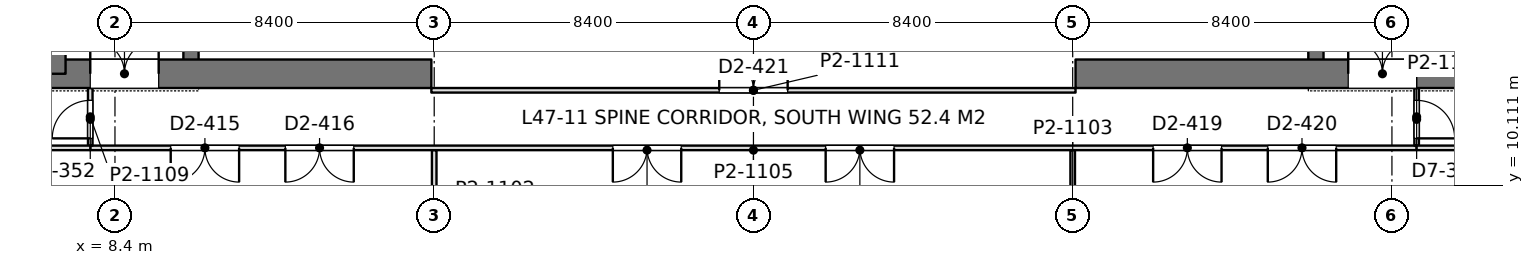
"""IFC4 building model, lengths in metres.
Left out: names, types, materials, properties, quantities, classifications, styles, units other than length and angle.
Written with IfcOpenShell. Run it as: python <this file> out.ifc"""

import sys

from ifc_helpers import new_model, si_unit, direction, frame, frame_2d, origin, place, context, subcontext, project, spatial, rectangle, extrude, element, fill, save


model = new_model("IFC4")
c1 = context("Model", 3, precision=1e-05, world=origin(), true_north=direction((0.0, 1.0)))
c2 = subcontext(c1, "Body", "Model", "MODEL_VIEW")
j1 = project(units=[si_unit("LENGTHUNIT", "METRE"), si_unit("PLANEANGLEUNIT", "RADIAN")], contexts=[c1])
p1 = place(None, origin())
s1 = spatial("IfcSite", under=j1, at=p1, CompositionType="ELEMENT")
p2 = place(p1, origin())
s2 = spatial("IfcBuilding", under=s1, at=p2, CompositionType="ELEMENT")
p3 = place(p2, frame((0.0, 0.0, 207.0)))
s3 = spatial("IfcBuildingStorey", under=s2, at=p3, CompositionType="ELEMENT", Elevation=207.0)
p4 = place(p3, frame((-1.125, 13.05, 0.0), z_axis=(0.0, 0.0, 1.0), x_axis=(1.0, 0.0, 0.0)))
e1 = element("IfcWall", 1, at=p4, inside=s3, PredefinedType="SHEAR", context=c2, shape_type="SweptSolid", body=[
    extrude(rectangle(XDim=17.85, YDim=0.75, at=frame_2d((8.925, 0.0))), origin(), (0.0, 0.0, 1.0), 4.2),
])
p5 = place(p4, frame((8.875, 0.0, 0.0)))
e2 = element("IfcOpeningElement", 2, at=p5, cuts=e1, PredefinedType="OPENING", context=c2, shape_type="SweptSolid", body=[
    extrude(rectangle(XDim=1.8, YDim=2.4, at=frame_2d((0.9, 1.2))), frame((0.0, 0.385, 0.0), z_axis=(0.0, -1.0, 0.0), x_axis=(1.0, 0.0, 0.0)), (0.0, 0.0, 1.0), 0.77),
])
p6 = place(p3, frame((6.9, 13.05, 0.0), z_axis=(0.0, 0.0, 1.0), x_axis=(0.0, 1.0, 0.0)))
e3 = element("IfcWall", 3, at=p6, inside=s3, PredefinedType="SHEAR", context=c2, shape_type="SweptSolid", body=[
    extrude(rectangle(XDim=24.3, YDim=0.4, at=frame_2d((12.15, 0.0))), origin(), (0.0, 0.0, 1.0), 4.2),
])
p7 = place(p6, frame((1.3, 0.0, 0.0)))
e4 = element("IfcOpeningElement", 4, at=p7, cuts=e3, PredefinedType="OPENING", context=c2, shape_type="SweptSolid", body=[
    extrude(rectangle(XDim=1.0, YDim=2.2, at=frame_2d((0.5, 1.1))), frame((0.0, 0.21, 0.0), z_axis=(0.0, -1.0, 0.0), x_axis=(1.0, 0.0, 0.0)), (0.0, 0.0, 1.0), 0.42),
])
p8 = place(p6, frame((22.0, 0.0, 0.0)))
e5 = element("IfcOpeningElement", 5, at=p8, cuts=e3, PredefinedType="OPENING", context=c2, shape_type="SweptSolid", body=[
    extrude(rectangle(XDim=1.0, YDim=2.2, at=frame_2d((0.5, 1.1))), frame((0.0, 0.21, 0.0), z_axis=(0.0, -1.0, 0.0), x_axis=(1.0, 0.0, 0.0)), (0.0, 0.0, 1.0), 0.42),
])
p9 = place(p6, frame((5.55, 0.0, 0.0)))
e6 = element("IfcOpeningElement", 6, at=p9, cuts=e3, PredefinedType="OPENING", context=c2, shape_type="SweptSolid", body=[
    extrude(rectangle(XDim=1.0, YDim=2.2, at=frame_2d((0.5, 1.1))), frame((0.0, 0.21, 0.0), z_axis=(0.0, -1.0, 0.0), x_axis=(1.0, 0.0, 0.0)), (0.0, 0.0, 1.0), 0.42),
])
p10 = place(p6, frame((9.55, 0.0, 0.0)))
e7 = element("IfcOpeningElement", 7, at=p10, cuts=e3, PredefinedType="OPENING", context=c2, shape_type="SweptSolid", body=[
    extrude(rectangle(XDim=1.0, YDim=2.2, at=frame_2d((0.5, 1.1))), frame((0.0, 0.21, 0.0), z_axis=(0.0, -1.0, 0.0), x_axis=(1.0, 0.0, 0.0)), (0.0, 0.0, 1.0), 0.42),
])
p11 = place(p6, frame((12.8, 0.0, 0.0)))
e8 = element("IfcOpeningElement", 8, at=p11, cuts=e3, PredefinedType="OPENING", context=c2, shape_type="SweptSolid", body=[
    extrude(rectangle(XDim=1.1, YDim=2.2, at=frame_2d((0.55, 1.1))), frame((0.0, 0.21, 0.0), z_axis=(0.0, -1.0, 0.0), x_axis=(1.0, 0.0, 0.0)), (0.0, 0.0, 1.0), 0.42),
])
p12 = place(p6, frame((15.538, 0.0, 0.0)))
e9 = element("IfcOpeningElement", 9, at=p12, cuts=e3, PredefinedType="OPENING", context=c2, shape_type="SweptSolid", body=[
    extrude(rectangle(XDim=1.1, YDim=2.2, at=frame_2d((0.55, 1.1))), frame((0.0, 0.21, 0.0), z_axis=(0.0, -1.0, 0.0), x_axis=(1.0, 0.0, 0.0)), (0.0, 0.0, 1.0), 0.42),
])
p13 = place(p6, frame((18.262, 0.0, 0.0)))
e10 = element("IfcOpeningElement", 10, at=p13, cuts=e3, PredefinedType="OPENING", context=c2, shape_type="SweptSolid", body=[
    extrude(rectangle(XDim=1.1, YDim=2.2, at=frame_2d((0.55, 1.1))), frame((0.0, 0.21, 0.0), z_axis=(0.0, -1.0, 0.0), x_axis=(1.0, 0.0, 0.0)), (0.0, 0.0, 1.0), 0.42),
])
p14 = place(p3, frame((10.4, 13.05, 0.0), z_axis=(0.0, 0.0, 1.0), x_axis=(0.0, 1.0, 0.0)))
e11 = element("IfcWall", 11, at=p14, inside=s3, PredefinedType="SHEAR", context=c2, shape_type="SweptSolid", body=[
    extrude(rectangle(XDim=24.3, YDim=0.4, at=frame_2d((12.15, 0.0))), origin(), (0.0, 0.0, 1.0), 4.2),
])
p15 = place(p14, frame((15.75, 0.0, 0.0)))
e12 = element("IfcOpeningElement", 12, at=p15, cuts=e11, PredefinedType="OPENING", context=c2, shape_type="SweptSolid", body=[
    extrude(rectangle(XDim=1.1, YDim=2.2, at=frame_2d((0.55, 1.1))), frame((0.0, 0.21, 0.0), z_axis=(0.0, -1.0, 0.0), x_axis=(1.0, 0.0, 0.0)), (0.0, 0.0, 1.0), 0.42),
])
p16 = place(p14, frame((18.6, 0.0, 0.0)))
e13 = element("IfcOpeningElement", 13, at=p16, cuts=e11, PredefinedType="OPENING", context=c2, shape_type="SweptSolid", body=[
    extrude(rectangle(XDim=1.1, YDim=2.2, at=frame_2d((0.55, 1.1))), frame((0.0, 0.21, 0.0), z_axis=(0.0, -1.0, 0.0), x_axis=(1.0, 0.0, 0.0)), (0.0, 0.0, 1.0), 0.42),
])
p17 = place(p14, frame((21.45, 0.0, 0.0)))
e14 = element("IfcOpeningElement", 14, at=p17, cuts=e11, PredefinedType="OPENING", context=c2, shape_type="SweptSolid", body=[
    extrude(rectangle(XDim=1.1, YDim=2.2, at=frame_2d((0.55, 1.1))), frame((0.0, 0.21, 0.0), z_axis=(0.0, -1.0, 0.0), x_axis=(1.0, 0.0, 0.0)), (0.0, 0.0, 1.0), 0.42),
])
p18 = place(p14, frame((8.65, 0.0, 0.0)))
e15 = element("IfcOpeningElement", 15, at=p18, cuts=e11, PredefinedType="OPENING", context=c2, shape_type="SweptSolid", body=[
    extrude(rectangle(XDim=1.8, YDim=2.4, at=frame_2d((0.9, 1.2))), frame((0.0, 0.21, 0.0), z_axis=(0.0, -1.0, 0.0), x_axis=(1.0, 0.0, 0.0)), (0.0, 0.0, 1.0), 0.42),
])
p19 = place(p3, frame((33.675, 13.05, 0.0), z_axis=(0.0, 0.0, 1.0), x_axis=(1.0, 0.0, 0.0)))
e16 = element("IfcWall", 16, at=p19, inside=s3, PredefinedType="SHEAR", context=c2, shape_type="SweptSolid", body=[
    extrude(rectangle(XDim=17.85, YDim=0.75, at=frame_2d((8.925, 0.0))), origin(), (0.0, 0.0, 1.0), 4.2),
])
p20 = place(p19, frame((7.175, 0.0, 0.0)))
e17 = element("IfcOpeningElement", 17, at=p20, cuts=e16, PredefinedType="OPENING", context=c2, shape_type="SweptSolid", body=[
    extrude(rectangle(XDim=1.8, YDim=2.4, at=frame_2d((0.9, 1.2))), frame((0.0, 0.385, 0.0), z_axis=(0.0, -1.0, 0.0), x_axis=(1.0, 0.0, 0.0)), (0.0, 0.0, 1.0), 0.77),
])
p21 = place(p3, frame((43.5, 13.05, 0.0), z_axis=(0.0, 0.0, 1.0), x_axis=(0.0, 1.0, 0.0)))
e18 = element("IfcWall", 18, at=p21, inside=s3, PredefinedType="SHEAR", context=c2, shape_type="SweptSolid", body=[
    extrude(rectangle(XDim=24.3, YDim=0.4, at=frame_2d((12.15, 0.0))), origin(), (0.0, 0.0, 1.0), 4.2),
])
p22 = place(p21, frame((1.3, 0.0, 0.0)))
e19 = element("IfcOpeningElement", 19, at=p22, cuts=e18, PredefinedType="OPENING", context=c2, shape_type="SweptSolid", body=[
    extrude(rectangle(XDim=1.0, YDim=2.2, at=frame_2d((0.5, 1.1))), frame((0.0, 0.21, 0.0), z_axis=(0.0, -1.0, 0.0), x_axis=(1.0, 0.0, 0.0)), (0.0, 0.0, 1.0), 0.42),
])
p23 = place(p21, frame((22.0, 0.0, 0.0)))
e20 = element("IfcOpeningElement", 20, at=p23, cuts=e18, PredefinedType="OPENING", context=c2, shape_type="SweptSolid", body=[
    extrude(rectangle(XDim=1.0, YDim=2.2, at=frame_2d((0.5, 1.1))), frame((0.0, 0.21, 0.0), z_axis=(0.0, -1.0, 0.0), x_axis=(1.0, 0.0, 0.0)), (0.0, 0.0, 1.0), 0.42),
])
p24 = place(p21, frame((5.55, 0.0, 0.0)))
e21 = element("IfcOpeningElement", 21, at=p24, cuts=e18, PredefinedType="OPENING", context=c2, shape_type="SweptSolid", body=[
    extrude(rectangle(XDim=1.0, YDim=2.2, at=frame_2d((0.5, 1.1))), frame((0.0, 0.21, 0.0), z_axis=(0.0, -1.0, 0.0), x_axis=(1.0, 0.0, 0.0)), (0.0, 0.0, 1.0), 0.42),
])
p25 = place(p21, frame((9.55, 0.0, 0.0)))
e22 = element("IfcOpeningElement", 22, at=p25, cuts=e18, PredefinedType="OPENING", context=c2, shape_type="SweptSolid", body=[
    extrude(rectangle(XDim=1.0, YDim=2.2, at=frame_2d((0.5, 1.1))), frame((0.0, 0.21, 0.0), z_axis=(0.0, -1.0, 0.0), x_axis=(1.0, 0.0, 0.0)), (0.0, 0.0, 1.0), 0.42),
])
p26 = place(p21, frame((12.8, 0.0, 0.0)))
e23 = element("IfcOpeningElement", 23, at=p26, cuts=e18, PredefinedType="OPENING", context=c2, shape_type="SweptSolid", body=[
    extrude(rectangle(XDim=1.1, YDim=2.2, at=frame_2d((0.55, 1.1))), frame((0.0, 0.21, 0.0), z_axis=(0.0, -1.0, 0.0), x_axis=(1.0, 0.0, 0.0)), (0.0, 0.0, 1.0), 0.42),
])
p27 = place(p21, frame((15.538, 0.0, 0.0)))
e24 = element("IfcOpeningElement", 24, at=p27, cuts=e18, PredefinedType="OPENING", context=c2, shape_type="SweptSolid", body=[
    extrude(rectangle(XDim=1.1, YDim=2.2, at=frame_2d((0.55, 1.1))), frame((0.0, 0.21, 0.0), z_axis=(0.0, -1.0, 0.0), x_axis=(1.0, 0.0, 0.0)), (0.0, 0.0, 1.0), 0.42),
])
p28 = place(p21, frame((18.262, 0.0, 0.0)))
e25 = element("IfcOpeningElement", 25, at=p28, cuts=e18, PredefinedType="OPENING", context=c2, shape_type="SweptSolid", body=[
    extrude(rectangle(XDim=1.1, YDim=2.2, at=frame_2d((0.55, 1.1))), frame((0.0, 0.21, 0.0), z_axis=(0.0, -1.0, 0.0), x_axis=(1.0, 0.0, 0.0)), (0.0, 0.0, 1.0), 0.42),
])
p29 = place(p3, frame((40.0, 13.05, 0.0), z_axis=(0.0, 0.0, 1.0), x_axis=(0.0, 1.0, 0.0)))
e26 = element("IfcWall", 26, at=p29, inside=s3, PredefinedType="SHEAR", context=c2, shape_type="SweptSolid", body=[
    extrude(rectangle(XDim=24.3, YDim=0.4, at=frame_2d((12.15, 0.0))), origin(), (0.0, 0.0, 1.0), 4.2),
])
p30 = place(p29, frame((15.75, 0.0, 0.0)))
e27 = element("IfcOpeningElement", 27, at=p30, cuts=e26, PredefinedType="OPENING", context=c2, shape_type="SweptSolid", body=[
    extrude(rectangle(XDim=1.1, YDim=2.2, at=frame_2d((0.55, 1.1))), frame((0.0, 0.21, 0.0), z_axis=(0.0, -1.0, 0.0), x_axis=(1.0, 0.0, 0.0)), (0.0, 0.0, 1.0), 0.42),
])
p31 = place(p29, frame((18.6, 0.0, 0.0)))
e28 = element("IfcOpeningElement", 28, at=p31, cuts=e26, PredefinedType="OPENING", context=c2, shape_type="SweptSolid", body=[
    extrude(rectangle(XDim=1.1, YDim=2.2, at=frame_2d((0.55, 1.1))), frame((0.0, 0.21, 0.0), z_axis=(0.0, -1.0, 0.0), x_axis=(1.0, 0.0, 0.0)), (0.0, 0.0, 1.0), 0.42),
])
p32 = place(p29, frame((21.45, 0.0, 0.0)))
e29 = element("IfcOpeningElement", 29, at=p32, cuts=e26, PredefinedType="OPENING", context=c2, shape_type="SweptSolid", body=[
    extrude(rectangle(XDim=1.1, YDim=2.2, at=frame_2d((0.55, 1.1))), frame((0.0, 0.21, 0.0), z_axis=(0.0, -1.0, 0.0), x_axis=(1.0, 0.0, 0.0)), (0.0, 0.0, 1.0), 0.42),
])
p33 = place(p29, frame((8.65, 0.0, 0.0)))
e30 = element("IfcOpeningElement", 30, at=p33, cuts=e26, PredefinedType="OPENING", context=c2, shape_type="SweptSolid", body=[
    extrude(rectangle(XDim=1.8, YDim=2.4, at=frame_2d((0.9, 1.2))), frame((0.0, 0.21, 0.0), z_axis=(0.0, -1.0, 0.0), x_axis=(1.0, 0.0, 0.0)), (0.0, 0.0, 1.0), 0.42),
])
for number, where, z_axis, x_axis in (
    (31, (16.8, 8.949, 0.0), (0.0, 0.0, 1.0), (0.0, 1.0, 0.0)),
    (32, (33.6, 8.949, 0.0), (0.0, 0.0, 1.0), (0.0, 1.0, 0.0)),
):
    element("IfcWall", number, at=place(p3, frame(where, z_axis=z_axis, x_axis=x_axis)), inside=s3, PredefinedType="PARTITIONING", context=c2, shape_type="SweptSolid", body=[
        extrude(rectangle(XDim=2.093, YDim=0.12, at=frame_2d((1.046, 0.0))), origin(), (0.0, 0.0, 1.0), 3.69),
    ])
p34 = place(p3, frame((7.748, 11.1, 0.0), z_axis=(0.0, 0.0, 1.0), x_axis=(1.0, 0.0, 0.0)))
e33 = element("IfcWall", 33, at=p34, inside=s3, PredefinedType="PARTITIONING", context=c2, shape_type="SweptSolid", body=[
    extrude(rectangle(XDim=34.904, YDim=0.12, at=frame_2d((17.452, 0.0))), origin(), (0.0, 0.0, 1.0), 3.55),
])
p35 = place(p34, frame((2.119, 0.0, 0.0)))
e34 = element("IfcOpeningElement", 34, at=p35, cuts=e33, PredefinedType="OPENING", context=c2, shape_type="SweptSolid", body=[
    extrude(rectangle(XDim=1.8, YDim=2.2, at=frame_2d((0.9, 1.1))), frame((0.0, 0.07, 0.0), z_axis=(0.0, -1.0, 0.0), x_axis=(1.0, 0.0, 0.0)), (0.0, 0.0, 1.0), 0.14),
])
p36 = place(p34, frame((5.135, 0.0, 0.0)))
e35 = element("IfcOpeningElement", 35, at=p36, cuts=e33, PredefinedType="OPENING", context=c2, shape_type="SweptSolid", body=[
    extrude(rectangle(XDim=1.8, YDim=2.2, at=frame_2d((0.9, 1.1))), frame((0.0, 0.07, 0.0), z_axis=(0.0, -1.0, 0.0), x_axis=(1.0, 0.0, 0.0)), (0.0, 0.0, 1.0), 0.14),
])
p37 = place(p34, frame((13.752, 0.0, 0.0)))
e36 = element("IfcOpeningElement", 36, at=p37, cuts=e33, PredefinedType="OPENING", context=c2, shape_type="SweptSolid", body=[
    extrude(rectangle(XDim=1.8, YDim=2.2, at=frame_2d((0.9, 1.1))), frame((0.0, 0.07, 0.0), z_axis=(0.0, -1.0, 0.0), x_axis=(1.0, 0.0, 0.0)), (0.0, 0.0, 1.0), 0.14),
])
p38 = place(p34, frame((19.352, 0.0, 0.0)))
e37 = element("IfcOpeningElement", 37, at=p38, cuts=e33, PredefinedType="OPENING", context=c2, shape_type="SweptSolid", body=[
    extrude(rectangle(XDim=1.8, YDim=2.2, at=frame_2d((0.9, 1.1))), frame((0.0, 0.07, 0.0), z_axis=(0.0, -1.0, 0.0), x_axis=(1.0, 0.0, 0.0)), (0.0, 0.0, 1.0), 0.14),
])
p39 = place(p34, frame((27.969, 0.0, 0.0)))
e38 = element("IfcOpeningElement", 38, at=p39, cuts=e33, PredefinedType="OPENING", context=c2, shape_type="SweptSolid", body=[
    extrude(rectangle(XDim=1.8, YDim=2.2, at=frame_2d((0.9, 1.1))), frame((0.0, 0.07, 0.0), z_axis=(0.0, -1.0, 0.0), x_axis=(1.0, 0.0, 0.0)), (0.0, 0.0, 1.0), 0.14),
])
p40 = place(p34, frame((30.985, 0.0, 0.0)))
e39 = element("IfcOpeningElement", 39, at=p40, cuts=e33, PredefinedType="OPENING", context=c2, shape_type="SweptSolid", body=[
    extrude(rectangle(XDim=1.8, YDim=2.2, at=frame_2d((0.9, 1.1))), frame((0.0, 0.07, 0.0), z_axis=(0.0, -1.0, 0.0), x_axis=(1.0, 0.0, 0.0)), (0.0, 0.0, 1.0), 0.14),
])
p41 = place(p3, frame((7.75, 11.158, 0.0), z_axis=(0.0, 0.0, 1.0), x_axis=(0.0, 1.0, 0.0)))
e40 = element("IfcWall", 40, at=p41, inside=s3, PredefinedType="PARTITIONING", context=c2, shape_type="SweptSolid", body=[
    extrude(rectangle(XDim=1.518, YDim=0.12, at=frame_2d((0.759, 0.0))), origin(), (0.0, 0.0, 1.0), 4.05),
])
p42 = place(p41, frame((0.192, 0.0, 0.0)))
e41 = element("IfcOpeningElement", 41, at=p42, cuts=e40, PredefinedType="OPENING", context=c2, shape_type="SweptSolid", body=[
    extrude(rectangle(XDim=1.0, YDim=2.4, at=frame_2d((0.5, 1.2))), frame((0.0, 0.07, 0.0), z_axis=(0.0, -1.0, 0.0), x_axis=(1.0, 0.0, 0.0)), (0.0, 0.0, 1.0), 0.14),
])
p43 = place(p3, frame((42.65, 11.158, 0.0), z_axis=(0.0, 0.0, 1.0), x_axis=(0.0, 1.0, 0.0)))
e42 = element("IfcWall", 42, at=p43, inside=s3, PredefinedType="PARTITIONING", context=c2, shape_type="SweptSolid", body=[
    extrude(rectangle(XDim=1.518, YDim=0.12, at=frame_2d((0.759, 0.0))), origin(), (0.0, 0.0, 1.0), 4.05),
])
p44 = place(p43, frame((0.192, 0.0, 0.0)))
e43 = element("IfcOpeningElement", 43, at=p44, cuts=e42, PredefinedType="OPENING", context=c2, shape_type="SweptSolid", body=[
    extrude(rectangle(XDim=1.0, YDim=2.4, at=frame_2d((0.5, 1.2))), frame((0.0, 0.07, 0.0), z_axis=(0.0, -1.0, 0.0), x_axis=(1.0, 0.0, 0.0)), (0.0, 0.0, 1.0), 0.14),
])
for number, where, z_axis, x_axis in (
    (44, (1.2, 11.1, 0.0), (0.0, 0.0, 1.0), (1.0, 0.0, 0.0)),
    (45, (42.648, 11.1, 0.0), (0.0, 0.0, 1.0), (1.0, 0.0, 0.0)),
):
    element("IfcWall", number, at=place(p3, frame(where, z_axis=z_axis, x_axis=x_axis)), inside=s3, PredefinedType="PARTITIONING", context=c2, shape_type="SweptSolid", body=[
        extrude(rectangle(XDim=6.552, YDim=0.12, at=frame_2d((3.276, 0.0))), origin(), (0.0, 0.0, 1.0), 4.05),
    ])
p45 = place(p3, frame((16.725, 12.615, 0.0), z_axis=(0.0, 0.0, 1.0), x_axis=(1.0, 0.0, 0.0)))
e46 = element("IfcWall", 46, at=p45, inside=s3, PredefinedType="PARTITIONING", context=c2, shape_type="SweptSolid", body=[
    extrude(rectangle(XDim=16.95, YDim=0.12, at=frame_2d((8.475, 0.0))), origin(), (0.0, 0.0, 1.0), 3.55),
])
p46 = place(p45, frame((7.575, 0.0, 0.0)))
e47 = element("IfcOpeningElement", 47, at=p46, cuts=e46, PredefinedType="OPENING", context=c2, shape_type="SweptSolid", body=[
    extrude(rectangle(XDim=1.8, YDim=2.2, at=frame_2d((0.9, 1.1))), frame((0.0, 0.07, 0.0), z_axis=(0.0, -1.0, 0.0), x_axis=(1.0, 0.0, 0.0)), (0.0, 0.0, 1.0), 0.14),
])
p47 = place(p5, origin())
e48 = element("IfcDoor", 48, at=p47, inside=s3, OperationType="DOUBLE_DOOR_SINGLE_SWING", PredefinedType="DOOR", context=c2, shape_type="SweptSolid", body=[
    extrude(rectangle(XDim=1.8, YDim=2.4, at=frame_2d((0.9, 1.2))), frame((0.0, 0.025, 0.0), z_axis=(0.0, -1.0, 0.0), x_axis=(1.0, 0.0, 0.0)), (0.0, 0.0, 1.0), 0.05),
])
fill(e2, e48)
p48 = place(p20, origin())
e49 = element("IfcDoor", 49, at=p48, inside=s3, OperationType="DOUBLE_DOOR_SINGLE_SWING", PredefinedType="DOOR", context=c2, shape_type="SweptSolid", body=[
    extrude(rectangle(XDim=1.8, YDim=2.4, at=frame_2d((0.9, 1.2))), frame((0.0, 0.025, 0.0), z_axis=(0.0, -1.0, 0.0), x_axis=(1.0, 0.0, 0.0)), (0.0, 0.0, 1.0), 0.05),
])
fill(e17, e49)
p49 = place(p35, frame((1.8, 0.0, 0.0), z_axis=(0.0, 0.0, 1.0), x_axis=(-1.0, 0.0, 0.0)))
e50 = element("IfcDoor", 50, at=p49, inside=s3, OperationType="DOUBLE_DOOR_SINGLE_SWING", PredefinedType="DOOR", context=c2, shape_type="SweptSolid", body=[
    extrude(rectangle(XDim=1.8, YDim=2.2, at=frame_2d((0.9, 1.1))), frame((0.0, 0.025, 0.0), z_axis=(0.0, -1.0, 0.0), x_axis=(1.0, 0.0, 0.0)), (0.0, 0.0, 1.0), 0.05),
])
fill(e34, e50)
p50 = place(p36, frame((1.8, 0.0, 0.0), z_axis=(0.0, 0.0, 1.0), x_axis=(-1.0, 0.0, 0.0)))
e51 = element("IfcDoor", 51, at=p50, inside=s3, OperationType="DOUBLE_DOOR_SINGLE_SWING", PredefinedType="DOOR", context=c2, shape_type="SweptSolid", body=[
    extrude(rectangle(XDim=1.8, YDim=2.2, at=frame_2d((0.9, 1.1))), frame((0.0, 0.025, 0.0), z_axis=(0.0, -1.0, 0.0), x_axis=(1.0, 0.0, 0.0)), (0.0, 0.0, 1.0), 0.05),
])
fill(e35, e51)
p51 = place(p37, frame((1.8, 0.0, 0.0), z_axis=(0.0, 0.0, 1.0), x_axis=(-1.0, 0.0, 0.0)))
e52 = element("IfcDoor", 52, at=p51, inside=s3, OperationType="DOUBLE_DOOR_SINGLE_SWING", PredefinedType="DOOR", context=c2, shape_type="SweptSolid", body=[
    extrude(rectangle(XDim=1.8, YDim=2.2, at=frame_2d((0.9, 1.1))), frame((0.0, 0.025, 0.0), z_axis=(0.0, -1.0, 0.0), x_axis=(1.0, 0.0, 0.0)), (0.0, 0.0, 1.0), 0.05),
])
fill(e36, e52)
p52 = place(p38, frame((1.8, 0.0, 0.0), z_axis=(0.0, 0.0, 1.0), x_axis=(-1.0, 0.0, 0.0)))
e53 = element("IfcDoor", 53, at=p52, inside=s3, OperationType="DOUBLE_DOOR_SINGLE_SWING", PredefinedType="DOOR", context=c2, shape_type="SweptSolid", body=[
    extrude(rectangle(XDim=1.8, YDim=2.2, at=frame_2d((0.9, 1.1))), frame((0.0, 0.025, 0.0), z_axis=(0.0, -1.0, 0.0), x_axis=(1.0, 0.0, 0.0)), (0.0, 0.0, 1.0), 0.05),
])
fill(e37, e53)
p53 = place(p39, frame((1.8, 0.0, 0.0), z_axis=(0.0, 0.0, 1.0), x_axis=(-1.0, 0.0, 0.0)))
e54 = element("IfcDoor", 54, at=p53, inside=s3, OperationType="DOUBLE_DOOR_SINGLE_SWING", PredefinedType="DOOR", context=c2, shape_type="SweptSolid", body=[
    extrude(rectangle(XDim=1.8, YDim=2.2, at=frame_2d((0.9, 1.1))), frame((0.0, 0.025, 0.0), z_axis=(0.0, -1.0, 0.0), x_axis=(1.0, 0.0, 0.0)), (0.0, 0.0, 1.0), 0.05),
])
fill(e38, e54)
p54 = place(p40, frame((1.8, 0.0, 0.0), z_axis=(0.0, 0.0, 1.0), x_axis=(-1.0, 0.0, 0.0)))
e55 = element("IfcDoor", 55, at=p54, inside=s3, OperationType="DOUBLE_DOOR_SINGLE_SWING", PredefinedType="DOOR", context=c2, shape_type="SweptSolid", body=[
    extrude(rectangle(XDim=1.8, YDim=2.2, at=frame_2d((0.9, 1.1))), frame((0.0, 0.025, 0.0), z_axis=(0.0, -1.0, 0.0), x_axis=(1.0, 0.0, 0.0)), (0.0, 0.0, 1.0), 0.05),
])
fill(e39, e55)
p55 = place(p42, origin())
e56 = element("IfcDoor", 56, at=p55, inside=s3, OperationType="SINGLE_SWING_LEFT", PredefinedType="DOOR", context=c2, shape_type="SweptSolid", body=[
    extrude(rectangle(XDim=1.0, YDim=2.4, at=frame_2d((0.5, 1.2))), frame((0.0, 0.025, 0.0), z_axis=(0.0, -1.0, 0.0), x_axis=(1.0, 0.0, 0.0)), (0.0, 0.0, 1.0), 0.05),
])
fill(e41, e56)
p56 = place(p44, frame((1.0, 0.0, 0.0), z_axis=(0.0, 0.0, 1.0), x_axis=(-1.0, 0.0, 0.0)))
e57 = element("IfcDoor", 57, at=p56, inside=s3, OperationType="SINGLE_SWING_RIGHT", PredefinedType="DOOR", context=c2, shape_type="SweptSolid", body=[
    extrude(rectangle(XDim=1.0, YDim=2.4, at=frame_2d((0.5, 1.2))), frame((0.0, 0.025, 0.0), z_axis=(0.0, -1.0, 0.0), x_axis=(1.0, 0.0, 0.0)), (0.0, 0.0, 1.0), 0.05),
])
fill(e43, e57)
p57 = place(p46, origin())
e58 = element("IfcDoor", 58, at=p57, inside=s3, OperationType="DOUBLE_DOOR_SINGLE_SWING", PredefinedType="DOOR", context=c2, shape_type="SweptSolid", body=[
    extrude(rectangle(XDim=1.8, YDim=2.2, at=frame_2d((0.9, 1.1))), frame((0.0, 0.025, 0.0), z_axis=(0.0, -1.0, 0.0), x_axis=(1.0, 0.0, 0.0)), (0.0, 0.0, 1.0), 0.05),
])
fill(e47, e58)
save(model, sys.argv[1])
